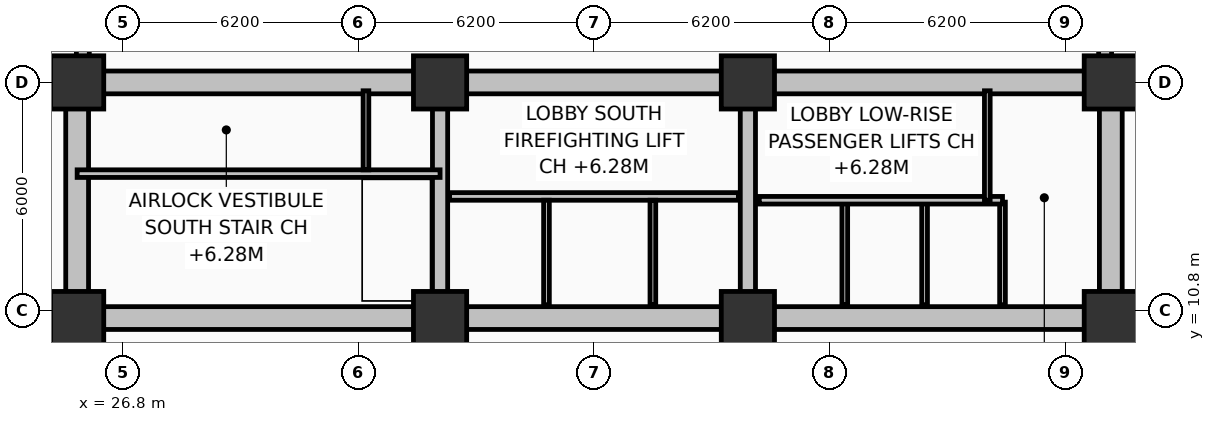
"""IFC4 building model, lengths in metres.
Left out: names, types, materials, properties, quantities, classifications, styles, units other than length and angle.
Written with IfcOpenShell. Run it as: python <this file> out.ifc"""

import sys

from ifc_helpers import new_model, si_unit, direction, frame, frame_2d, origin, origin_2d, place, context, subcontext, project, spatial, rectangle, extrude, element, fill, save


model = new_model("IFC4")
c1 = context("Model", 3, precision=1e-05, world=origin(), true_north=direction((0.0, 1.0)))
c2 = subcontext(c1, "Body", "Model", "MODEL_VIEW")
j1 = project(units=[si_unit("LENGTHUNIT", "METRE"), si_unit("PLANEANGLEUNIT", "RADIAN")], contexts=[c1])
p1 = place(None, origin())
s1 = spatial("IfcSite", under=j1, at=p1, CompositionType="ELEMENT")
p2 = place(p1, origin())
s2 = spatial("IfcBuilding", under=s1, at=p2, CompositionType="ELEMENT")
p3 = place(p2, origin())
s3 = spatial("IfcBuildingStorey", under=s2, at=p3, CompositionType="ELEMENT", Elevation=0.0)
p4 = place(p3, frame((52.8, 10.6, 0.0), z_axis=(0.0, 0.0, 1.0), x_axis=(-1.0, 0.0, 0.0)))
e1 = element("IfcWall", 1, at=p4, inside=s3, PredefinedType="SHEAR", context=c2, shape_type="SweptSolid", body=[
    extrude(rectangle(XDim=27.2, YDim=0.6, at=frame_2d((13.6, 0.0))), origin(), (0.0, 0.0, 1.0), 6.6),
])
p5 = place(p4, frame((25.18, 0.0, 0.0)))
e2 = element("IfcOpeningElement", 2, at=p5, cuts=e1, PredefinedType="OPENING", context=c2, shape_type="SweptSolid", body=[
    extrude(rectangle(XDim=1.0, YDim=2.15, at=frame_2d((0.5, 1.075))), frame((0.0, 0.31, 0.0), z_axis=(0.0, -1.0, 0.0), x_axis=(1.0, 0.0, 0.0)), (0.0, 0.0, 1.0), 0.62),
])
for number, where, z_axis, x_axis in (
    (3, (25.6, 10.9, 0.0), (0.0, 0.0, 1.0), (0.0, 1.0, 0.0)),
    (4, (52.8, 10.9, 0.0), (0.0, 0.0, 1.0), (0.0, 1.0, 0.0)),
):
    element("IfcWall", number, at=place(p3, frame(where, z_axis=z_axis, x_axis=x_axis)), inside=s3, PredefinedType="SHEAR", context=c2, shape_type="SweptSolid", body=[
        extrude(rectangle(XDim=5.6, YDim=0.6, at=frame_2d((2.8, 0.0))), origin(), (0.0, 0.0, 1.0), 6.6),
    ])
p6 = place(p3, frame((25.6, 16.8, 0.0), z_axis=(0.0, 0.0, 1.0), x_axis=(1.0, 0.0, 0.0)))
e5 = element("IfcWall", 5, at=p6, inside=s3, PredefinedType="SHEAR", context=c2, shape_type="SweptSolid", body=[
    extrude(rectangle(XDim=27.2, YDim=0.6, at=frame_2d((13.6, 0.0))), origin(), (0.0, 0.0, 1.0), 6.6),
])
p7 = place(p6, frame((1.9, 0.0, 0.0)))
e6 = element("IfcOpeningElement", 6, at=p7, cuts=e5, PredefinedType="OPENING", context=c2, shape_type="SweptSolid", body=[
    extrude(rectangle(XDim=1.1, YDim=2.15, at=frame_2d((0.55, 1.075))), frame((0.0, 0.31, 0.0), z_axis=(0.0, -1.0, 0.0), x_axis=(1.0, 0.0, 0.0)), (0.0, 0.0, 1.0), 0.62),
])
p8 = place(p6, frame((13.0, 0.0, 0.0)))
e7 = element("IfcOpeningElement", 7, at=p8, cuts=e5, PredefinedType="OPENING", context=c2, shape_type="SweptSolid", body=[
    extrude(rectangle(XDim=1.2, YDim=2.15, at=frame_2d((0.6, 1.075))), frame((0.0, 0.31, 0.0), z_axis=(0.0, -1.0, 0.0), x_axis=(1.0, 0.0, 0.0)), (0.0, 0.0, 1.0), 0.62),
])
p9 = place(p6, frame((20.4, 0.0, 0.0)))
e8 = element("IfcOpeningElement", 8, at=p9, cuts=e5, PredefinedType="OPENING", context=c2, shape_type="SweptSolid", body=[
    extrude(rectangle(XDim=1.3, YDim=2.2, at=frame_2d((0.65, 1.1))), frame((0.0, 0.31, 0.0), z_axis=(0.0, -1.0, 0.0), x_axis=(1.0, 0.0, 0.0)), (0.0, 0.0, 1.0), 0.62),
])
p10 = place(p6, frame((24.65, 0.0, 0.0)))
e9 = element("IfcOpeningElement", 9, at=p10, cuts=e5, PredefinedType="OPENING", context=c2, shape_type="SweptSolid", body=[
    extrude(rectangle(XDim=0.85, YDim=2.1, at=frame_2d((0.425, 1.05))), frame((0.0, 0.31, 0.0), z_axis=(0.0, -1.0, 0.0), x_axis=(1.0, 0.0, 0.0)), (0.0, 0.0, 1.0), 0.62),
])
for number, where, z_axis, x_axis in (
    (10, (35.15, 10.9, 0.0), (0.0, 0.0, 1.0), (0.0, 1.0, 0.0)),
    (11, (43.25, 10.9, 0.0), (0.0, 0.0, 1.0), (0.0, 1.0, 0.0)),
):
    element("IfcWall", number, at=place(p3, frame(where, z_axis=z_axis, x_axis=x_axis)), inside=s3, PredefinedType="SHEAR", context=c2, shape_type="SweptSolid", body=[
        extrude(rectangle(XDim=5.6, YDim=0.4, at=frame_2d((2.8, 0.0))), origin(), (0.0, 0.0, 1.0), 6.6),
    ])
for number, where, z_axis, x_axis in (
    (12, (25.6, 10.6, 0.0), (0.0, 0.0, 1.0), (1.0, 0.0, 0.0)),
    (13, (25.6, 16.8, 0.0), (0.0, 0.0, 1.0), (1.0, 0.0, 0.0)),
    (14, (35.15, 10.6, 0.0), (0.0, 0.0, 1.0), (1.0, 0.0, 0.0)),
    (15, (35.15, 16.8, 0.0), (0.0, 0.0, 1.0), (1.0, 0.0, 0.0)),
    (16, (43.25, 10.6, 0.0), (0.0, 0.0, 1.0), (1.0, 0.0, 0.0)),
    (17, (43.25, 16.8, 0.0), (0.0, 0.0, 1.0), (1.0, 0.0, 0.0)),
    (18, (52.8, 10.6, 0.0), (0.0, 0.0, 1.0), (1.0, 0.0, 0.0)),
    (19, (52.8, 16.8, 0.0), (0.0, 0.0, 1.0), (1.0, 0.0, 0.0)),
):
    element("IfcColumn", number, at=place(p3, frame(where, z_axis=z_axis, x_axis=x_axis)), inside=s3, PredefinedType="COLUMN", context=c2, shape_type="SweptSolid", body=[
        extrude(rectangle(XDim=1.4, YDim=1.4, at=origin_2d()), origin(), (0.0, 0.0, 1.0), 6.6),
    ])
p11 = place(p3, frame((25.75, 17.15, 0.0), z_axis=(0.0, 0.0, 1.0), x_axis=(0.0, 1.0, 0.0)))
e20 = element("IfcWall", 20, at=p11, inside=s3, PredefinedType="SOLIDWALL", context=c2, shape_type="SweptSolid", body=[
    extrude(rectangle(XDim=3.45, YDim=0.34, at=frame_2d((1.725, 0.0))), origin(), (0.0, 0.0, 1.0), 5.58),
])
p12 = place(p11, frame((0.7, 0.0, 0.0)))
e21 = element("IfcOpeningElement", 21, at=p12, cuts=e20, PredefinedType="OPENING", context=c2, shape_type="SweptSolid", body=[
    extrude(rectangle(XDim=2.0, YDim=2.45, at=frame_2d((1.0, 1.225))), frame((0.0, 0.18, 0.0), z_axis=(0.0, -1.0, 0.0), x_axis=(1.0, 0.0, 0.0)), (0.0, 0.0, 1.0), 0.36),
])
p13 = place(p3, frame((52.65, 17.15, 0.0), z_axis=(0.0, 0.0, 1.0), x_axis=(0.0, 1.0, 0.0)))
e22 = element("IfcWall", 22, at=p13, inside=s3, PredefinedType="SOLIDWALL", context=c2, shape_type="SweptSolid", body=[
    extrude(rectangle(XDim=3.45, YDim=0.34, at=frame_2d((1.725, 0.0))), origin(), (0.0, 0.0, 1.0), 5.58),
])
p14 = place(p13, frame((0.7, 0.0, 0.0)))
e23 = element("IfcOpeningElement", 23, at=p14, cuts=e22, PredefinedType="OPENING", context=c2, shape_type="SweptSolid", body=[
    extrude(rectangle(XDim=2.0, YDim=2.45, at=frame_2d((1.0, 1.225))), frame((0.0, 0.18, 0.0), z_axis=(0.0, -1.0, 0.0), x_axis=(1.0, 0.0, 0.0)), (0.0, 0.0, 1.0), 0.36),
])
p15 = place(p3, frame((25.6, 14.4, 0.0), z_axis=(0.0, 0.0, 1.0), x_axis=(1.0, 0.0, 0.0)))
e24 = element("IfcWall", 24, at=p15, inside=s3, PredefinedType="SHEAR", context=c2, shape_type="SweptSolid", body=[
    extrude(rectangle(XDim=9.55, YDim=0.2, at=frame_2d((4.775, 0.0))), origin(), (0.0, 0.0, 1.0), 6.6),
])
p16 = place(p15, frame((1.05, 0.0, 0.0)))
e25 = element("IfcOpeningElement", 25, at=p16, cuts=e24, PredefinedType="OPENING", context=c2, shape_type="SweptSolid", body=[
    extrude(rectangle(XDim=1.1, YDim=2.15, at=frame_2d((0.55, 1.075))), frame((0.0, 0.11, 0.0), z_axis=(0.0, -1.0, 0.0), x_axis=(1.0, 0.0, 0.0)), (0.0, 0.0, 1.0), 0.22),
])
p17 = place(p3, frame((33.2, 14.5, 0.0), z_axis=(0.0, 0.0, 1.0), x_axis=(0.0, 1.0, 0.0)))
e26 = element("IfcWall", 26, at=p17, inside=s3, PredefinedType="PARTITIONING", context=c2, shape_type="SweptSolid", body=[
    extrude(rectangle(XDim=2.08, YDim=0.15, at=frame_2d((1.04, 0.0))), origin(), (0.0, 0.0, 1.0), 5.52),
])
p18 = place(p17, frame((0.55, 0.0, 0.0)))
e27 = element("IfcOpeningElement", 27, at=p18, cuts=e26, PredefinedType="OPENING", context=c2, shape_type="SweptSolid", body=[
    extrude(rectangle(XDim=0.85, YDim=2.05, at=frame_2d((0.425, 1.025))), frame((0.0, 0.085, 0.0), z_axis=(0.0, -1.0, 0.0), x_axis=(1.0, 0.0, 0.0)), (0.0, 0.0, 1.0), 0.17),
])
p19 = place(p3, frame((35.4, 13.8, 0.0), z_axis=(0.0, 0.0, 1.0), x_axis=(1.0, 0.0, 0.0)))
e28 = element("IfcWall", 28, at=p19, inside=s3, PredefinedType="PARTITIONING", context=c2, shape_type="SweptSolid", body=[
    extrude(rectangle(XDim=7.6, YDim=0.2, at=frame_2d((3.8, 0.0))), origin(), (0.0, 0.0, 1.0), 5.18),
])
p20 = place(p19, frame((0.7, 0.0, 0.0)))
e29 = element("IfcOpeningElement", 29, at=p20, cuts=e28, PredefinedType="OPENING", context=c2, shape_type="SweptSolid", body=[
    extrude(rectangle(XDim=1.1, YDim=2.15, at=frame_2d((0.55, 1.075))), frame((0.0, 0.11, 0.0), z_axis=(0.0, -1.0, 0.0), x_axis=(1.0, 0.0, 0.0)), (0.0, 0.0, 1.0), 0.22),
])
p21 = place(p19, frame((3.35, 0.0, 0.0)))
e30 = element("IfcOpeningElement", 30, at=p21, cuts=e28, PredefinedType="OPENING", context=c2, shape_type="SweptSolid", body=[
    extrude(rectangle(XDim=1.2, YDim=2.15, at=frame_2d((0.6, 1.075))), frame((0.0, 0.11, 0.0), z_axis=(0.0, -1.0, 0.0), x_axis=(1.0, 0.0, 0.0)), (0.0, 0.0, 1.0), 0.22),
])
for number, where, z_axis, x_axis in (
    (31, (37.95, 10.95, 0.0), (0.0, 0.0, 1.0), (0.0, 1.0, 0.0)),
    (32, (40.75, 10.95, 0.0), (0.0, 0.0, 1.0), (0.0, 1.0, 0.0)),
):
    element("IfcWall", number, at=place(p3, frame(where, z_axis=z_axis, x_axis=x_axis)), inside=s3, PredefinedType="PARTITIONING", context=c2, shape_type="SweptSolid", body=[
        extrude(rectangle(XDim=2.75, YDim=0.15, at=frame_2d((1.375, 0.0))), origin(), (0.0, 0.0, 1.0), 5.52),
    ])
for number, where, z_axis, x_axis in (
    (33, (45.8, 10.95, 0.0), (0.0, 0.0, 1.0), (0.0, 1.0, 0.0)),
    (34, (47.9, 10.95, 0.0), (0.0, 0.0, 1.0), (0.0, 1.0, 0.0)),
    (35, (49.95, 10.95, 0.0), (0.0, 0.0, 1.0), (0.0, 1.0, 0.0)),
):
    element("IfcWall", number, at=place(p3, frame(where, z_axis=z_axis, x_axis=x_axis)), inside=s3, PredefinedType="PARTITIONING", context=c2, shape_type="SweptSolid", body=[
        extrude(rectangle(XDim=2.7, YDim=0.15, at=frame_2d((1.35, 0.0))), origin(), (0.0, 0.0, 1.0), 5.52),
    ])
p22 = place(p3, frame((43.55, 13.7, 0.0), z_axis=(0.0, 0.0, 1.0), x_axis=(1.0, 0.0, 0.0)))
e36 = element("IfcWall", 36, at=p22, inside=s3, PredefinedType="PARTITIONING", context=c2, shape_type="SweptSolid", body=[
    extrude(rectangle(XDim=6.4, YDim=0.2, at=frame_2d((3.2, 0.0))), origin(), (0.0, 0.0, 1.0), 5.52),
])
p23 = place(p22, frame((0.7, 0.0, 0.0)))
e37 = element("IfcOpeningElement", 37, at=p23, cuts=e36, PredefinedType="OPENING", context=c2, shape_type="SweptSolid", body=[
    extrude(rectangle(XDim=1.0, YDim=2.15, at=frame_2d((0.5, 1.075))), frame((0.0, 0.11, 0.0), z_axis=(0.0, -1.0, 0.0), x_axis=(1.0, 0.0, 0.0)), (0.0, 0.0, 1.0), 0.22),
])
p24 = place(p22, frame((2.8, 0.0, 0.0)))
e38 = element("IfcOpeningElement", 38, at=p24, cuts=e36, PredefinedType="OPENING", context=c2, shape_type="SweptSolid", body=[
    extrude(rectangle(XDim=1.0, YDim=2.15, at=frame_2d((0.5, 1.075))), frame((0.0, 0.11, 0.0), z_axis=(0.0, -1.0, 0.0), x_axis=(1.0, 0.0, 0.0)), (0.0, 0.0, 1.0), 0.22),
])
p25 = place(p22, frame((4.9, 0.0, 0.0)))
e39 = element("IfcOpeningElement", 39, at=p25, cuts=e36, PredefinedType="OPENING", context=c2, shape_type="SweptSolid", body=[
    extrude(rectangle(XDim=1.0, YDim=2.15, at=frame_2d((0.5, 1.075))), frame((0.0, 0.11, 0.0), z_axis=(0.0, -1.0, 0.0), x_axis=(1.0, 0.0, 0.0)), (0.0, 0.0, 1.0), 0.22),
])
p26 = place(p3, frame((49.55, 13.7, 0.0), z_axis=(0.0, 0.0, 1.0), x_axis=(0.0, 1.0, 0.0)))
e40 = element("IfcWall", 40, at=p26, inside=s3, PredefinedType="PARTITIONING", context=c2, shape_type="SweptSolid", body=[
    extrude(rectangle(XDim=2.88, YDim=0.15, at=frame_2d((1.44, 0.0))), origin(), (0.0, 0.0, 1.0), 5.52),
])
p27 = place(p16, origin())
e41 = element("IfcDoor", 41, at=p27, inside=s3, OperationType="SINGLE_SWING_LEFT", PredefinedType="DOOR", context=c2, shape_type="SweptSolid", body=[
    extrude(rectangle(XDim=1.1, YDim=2.15, at=frame_2d((0.55, 1.075))), frame((0.0, 0.025, 0.0), z_axis=(0.0, -1.0, 0.0), x_axis=(1.0, 0.0, 0.0)), (0.0, 0.0, 1.0), 0.05),
])
fill(e25, e41)
p28 = place(p18, origin())
e42 = element("IfcDoor", 42, at=p28, inside=s3, OperationType="SINGLE_SWING_RIGHT", PredefinedType="TRAPDOOR", context=c2, shape_type="SweptSolid", body=[
    extrude(rectangle(XDim=0.85, YDim=2.05, at=frame_2d((0.425, 1.025))), frame((0.0, 0.025, 0.0), z_axis=(0.0, -1.0, 0.0), x_axis=(1.0, 0.0, 0.0)), (0.0, 0.0, 1.0), 0.05),
])
fill(e27, e42)
p29 = place(p20, origin())
e43 = element("IfcDoor", 43, at=p29, inside=s3, OperationType="SLIDING_TO_LEFT", PredefinedType="DOOR", context=c2, shape_type="SweptSolid", body=[
    extrude(rectangle(XDim=1.1, YDim=2.15, at=frame_2d((0.55, 1.075))), frame((0.0, 0.025, 0.0), z_axis=(0.0, -1.0, 0.0), x_axis=(1.0, 0.0, 0.0)), (0.0, 0.0, 1.0), 0.05),
])
fill(e29, e43)
p30 = place(p21, origin())
e44 = element("IfcDoor", 44, at=p30, inside=s3, OperationType="SLIDING_TO_LEFT", PredefinedType="DOOR", context=c2, shape_type="SweptSolid", body=[
    extrude(rectangle(XDim=1.2, YDim=2.15, at=frame_2d((0.6, 1.075))), frame((0.0, 0.025, 0.0), z_axis=(0.0, -1.0, 0.0), x_axis=(1.0, 0.0, 0.0)), (0.0, 0.0, 1.0), 0.05),
])
fill(e30, e44)
p31 = place(p23, origin())
e45 = element("IfcDoor", 45, at=p31, inside=s3, OperationType="SLIDING_TO_LEFT", PredefinedType="DOOR", context=c2, shape_type="SweptSolid", body=[
    extrude(rectangle(XDim=1.0, YDim=2.15, at=frame_2d((0.5, 1.075))), frame((0.0, 0.025, 0.0), z_axis=(0.0, -1.0, 0.0), x_axis=(1.0, 0.0, 0.0)), (0.0, 0.0, 1.0), 0.05),
])
fill(e37, e45)
p32 = place(p24, origin())
e46 = element("IfcDoor", 46, at=p32, inside=s3, OperationType="SLIDING_TO_LEFT", PredefinedType="DOOR", context=c2, shape_type="SweptSolid", body=[
    extrude(rectangle(XDim=1.0, YDim=2.15, at=frame_2d((0.5, 1.075))), frame((0.0, 0.025, 0.0), z_axis=(0.0, -1.0, 0.0), x_axis=(1.0, 0.0, 0.0)), (0.0, 0.0, 1.0), 0.05),
])
fill(e38, e46)
p33 = place(p25, origin())
e47 = element("IfcDoor", 47, at=p33, inside=s3, OperationType="SLIDING_TO_LEFT", PredefinedType="DOOR", context=c2, shape_type="SweptSolid", body=[
    extrude(rectangle(XDim=1.0, YDim=2.15, at=frame_2d((0.5, 1.075))), frame((0.0, 0.025, 0.0), z_axis=(0.0, -1.0, 0.0), x_axis=(1.0, 0.0, 0.0)), (0.0, 0.0, 1.0), 0.05),
])
fill(e39, e47)
p34 = place(p5, origin())
e48 = element("IfcDoor", 48, at=p34, inside=s3, OperationType="SINGLE_SWING_LEFT", PredefinedType="DOOR", context=c2, shape_type="SweptSolid", body=[
    extrude(rectangle(XDim=1.0, YDim=2.15, at=frame_2d((0.5, 1.075))), frame((0.0, 0.025, 0.0), z_axis=(0.0, -1.0, 0.0), x_axis=(1.0, 0.0, 0.0)), (0.0, 0.0, 1.0), 0.05),
])
fill(e2, e48)
p35 = place(p7, origin())
e49 = element("IfcDoor", 49, at=p35, inside=s3, OperationType="SINGLE_SWING_RIGHT", PredefinedType="DOOR", context=c2, shape_type="SweptSolid", body=[
    extrude(rectangle(XDim=1.1, YDim=2.15, at=frame_2d((0.55, 1.075))), frame((0.0, 0.025, 0.0), z_axis=(0.0, -1.0, 0.0), x_axis=(1.0, 0.0, 0.0)), (0.0, 0.0, 1.0), 0.05),
])
fill(e6, e49)
p36 = place(p8, origin())
e50 = element("IfcDoor", 50, at=p36, inside=s3, OperationType="SINGLE_SWING_LEFT", PredefinedType="DOOR", context=c2, shape_type="SweptSolid", body=[
    extrude(rectangle(XDim=1.2, YDim=2.15, at=frame_2d((0.6, 1.075))), frame((0.0, 0.025, 0.0), z_axis=(0.0, -1.0, 0.0), x_axis=(1.0, 0.0, 0.0)), (0.0, 0.0, 1.0), 0.05),
])
fill(e7, e50)
p37 = place(p9, origin())
e51 = element("IfcDoor", 51, at=p37, inside=s3, OperationType="SINGLE_SWING_RIGHT", PredefinedType="DOOR", context=c2, shape_type="SweptSolid", body=[
    extrude(rectangle(XDim=1.3, YDim=2.2, at=frame_2d((0.65, 1.1))), frame((0.0, 0.025, 0.0), z_axis=(0.0, -1.0, 0.0), x_axis=(1.0, 0.0, 0.0)), (0.0, 0.0, 1.0), 0.05),
])
fill(e8, e51)
p38 = place(p10, origin())
e52 = element("IfcDoor", 52, at=p38, inside=s3, OperationType="SINGLE_SWING_LEFT", PredefinedType="DOOR", context=c2, shape_type="SweptSolid", body=[
    extrude(rectangle(XDim=0.85, YDim=2.1, at=frame_2d((0.425, 1.05))), frame((0.0, 0.025, 0.0), z_axis=(0.0, -1.0, 0.0), x_axis=(1.0, 0.0, 0.0)), (0.0, 0.0, 1.0), 0.05),
])
fill(e9, e52)
save(model, sys.argv[1])
